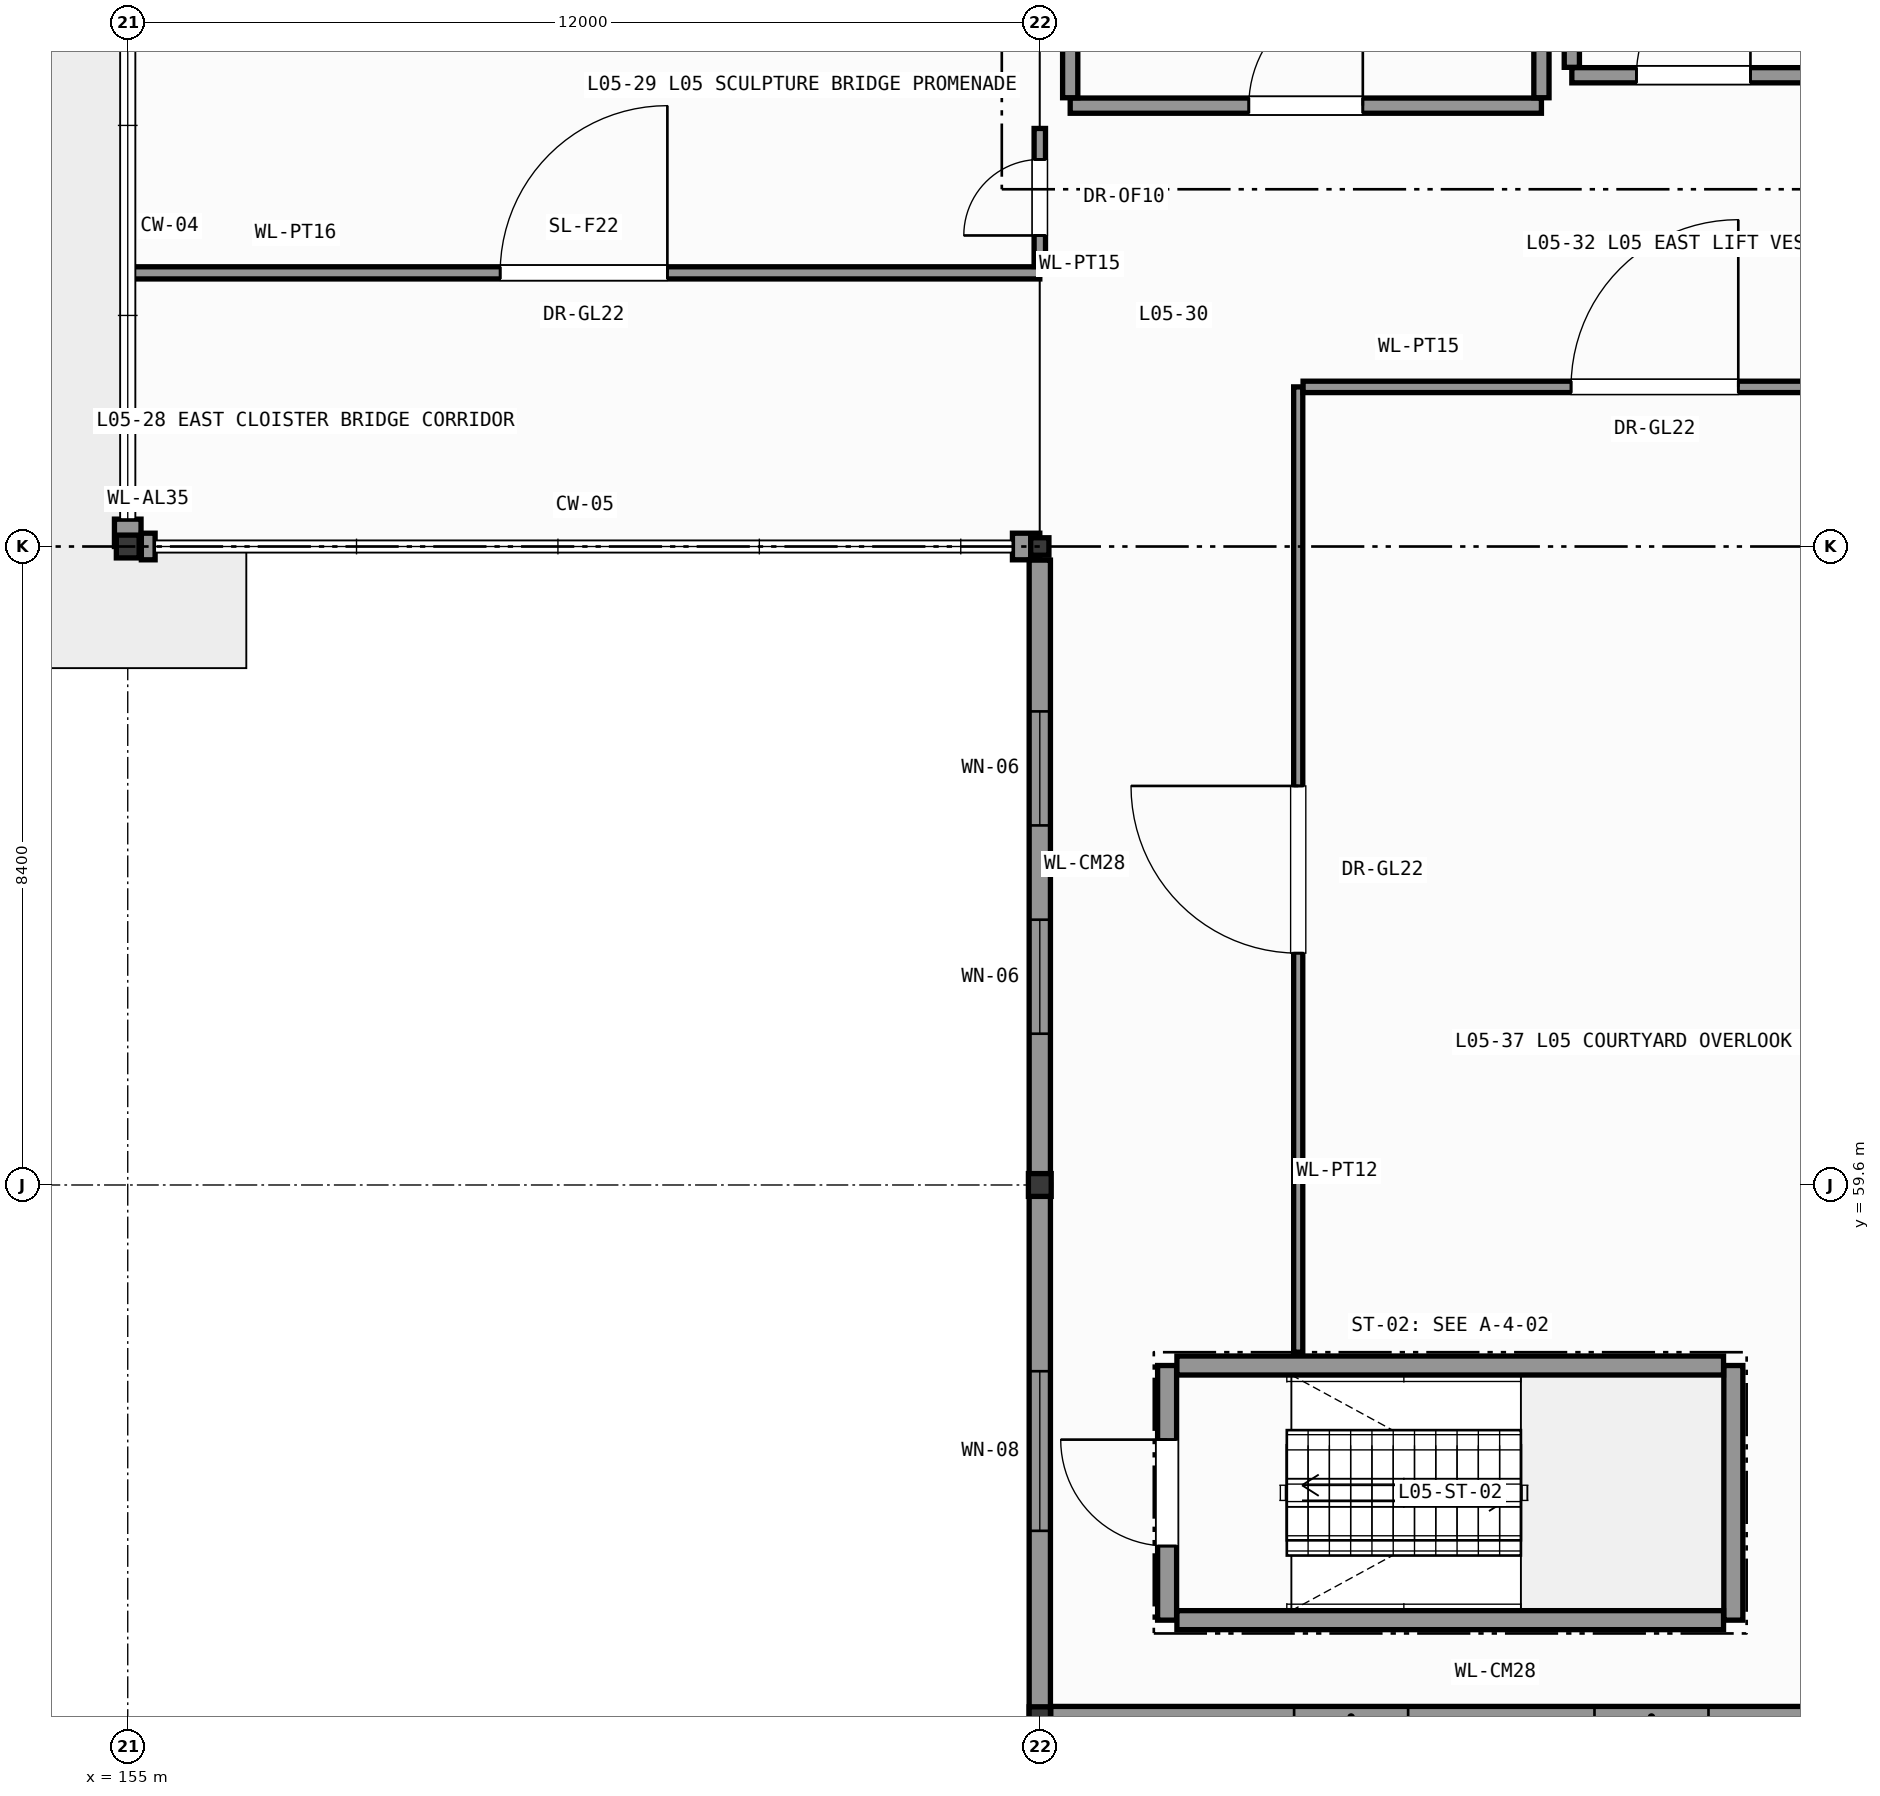
"""IFC4 building model, lengths in metres.
Left out: names, types, materials, properties, quantities, classifications, styles, units other than length and angle.
Written with IfcOpenShell. Run it as: python <this file> out.ifc"""

import sys

from ifc_helpers import new_model, si_unit, direction, frame, frame_2d, origin, origin_2d, place, context, subcontext, project, spatial, rectangle, i_section, extrude, element, fill, save


model = new_model("IFC4")
c1 = context("Model", 3, precision=1e-05, world=origin(), true_north=direction((0.0, 1.0)))
c2 = subcontext(c1, "Body", "Model", "MODEL_VIEW")
j1 = project(units=[si_unit("LENGTHUNIT", "METRE"), si_unit("PLANEANGLEUNIT", "RADIAN")], contexts=[c1])
p1 = place(None, origin())
s1 = spatial("IfcSite", under=j1, at=p1, CompositionType="ELEMENT")
p2 = place(p1, origin())
s2 = spatial("IfcBuilding", under=s1, at=p2, CompositionType="ELEMENT")
p3 = place(p2, frame((0.0, 0.0, 22.2)))
s3 = spatial("IfcBuildingStorey", under=s2, at=p3, CompositionType="ELEMENT", Elevation=22.2)
p4 = place(p3, frame((155.0, 68.0, 0.0), z_axis=(0.0, 0.0, 1.0), x_axis=(1.0, 0.0, 0.0)))
e1 = element("IfcColumn", 1, at=p4, inside=s3, PredefinedType="COLUMN", context=c2, shape_type="SweptSolid", body=[
    extrude(i_section(OverallWidth=0.3, OverallDepth=0.3, WebThickness=0.011, FlangeThickness=0.019, FilletRadius=0.027, at=origin_2d()), origin(), (0.0, 0.0, 1.0), 4.2),
])
p5 = place(p3, frame((167.0, 52.6, 0.0), z_axis=(0.0, 0.0, 1.0), x_axis=(1.0, 0.0, 0.0)))
e2 = element("IfcColumn", 2, at=p5, inside=s3, PredefinedType="COLUMN", context=c2, shape_type="SweptSolid", body=[
    extrude(i_section(OverallWidth=0.28, OverallDepth=0.27, WebThickness=0.008, FlangeThickness=0.013, FilletRadius=0.024, at=origin_2d()), origin(), (0.0, 0.0, 1.0), 4.2),
])
p6 = place(p3, frame((167.0, 59.6, 0.0), z_axis=(0.0, 0.0, 1.0), x_axis=(1.0, 0.0, 0.0)))
e3 = element("IfcColumn", 3, at=p6, inside=s3, PredefinedType="COLUMN", context=c2, shape_type="SweptSolid", body=[
    extrude(i_section(OverallWidth=0.3, OverallDepth=0.3, WebThickness=0.011, FlangeThickness=0.019, FilletRadius=0.027, at=origin_2d()), origin(), (0.0, 0.0, 1.0), 4.2),
])
p7 = place(p3, frame((167.0, 68.0, 0.0), z_axis=(0.0, 0.0, 1.0), x_axis=(1.0, 0.0, 0.0)))
e4 = element("IfcColumn", 4, at=p7, inside=s3, PredefinedType="COLUMN", context=c2, shape_type="SweptSolid", body=[
    extrude(i_section(OverallWidth=0.24, OverallDepth=0.23, WebThickness=0.008, FlangeThickness=0.012, FilletRadius=0.021, at=origin_2d()), origin(), (0.0, 0.0, 1.0), 4.2),
])
p8 = place(p3, frame((155.0, 68.36, 0.0), z_axis=(0.0, 0.0, 1.0), x_axis=(0.0, -1.0, 0.0)))
e5 = element("IfcWall", 5, at=p8, inside=s3, PredefinedType="SOLIDWALL", context=c2, shape_type="SweptSolid", body=[
    extrude(rectangle(XDim=0.36, YDim=0.35, at=frame_2d((0.18, 0.0))), origin(), (0.0, 0.0, 1.0), 3.485),
])
p9 = place(p3, frame((155.179, 68.0, 0.0), z_axis=(0.0, 0.0, 1.0), x_axis=(1.0, 0.0, 0.0)))
e6 = element("IfcWall", 6, at=p9, inside=s3, PredefinedType="SOLIDWALL", context=c2, shape_type="SweptSolid", body=[
    extrude(rectangle(XDim=0.181, YDim=0.35, at=frame_2d((0.091, 0.0))), origin(), (0.0, 0.0, 1.0), 3.98),
])
p10 = place(p3, frame((166.64, 68.0, 0.0), z_axis=(0.0, 0.0, 1.0), x_axis=(1.0, 0.0, 0.0)))
e7 = element("IfcWall", 7, at=p10, inside=s3, PredefinedType="SOLIDWALL", context=c2, shape_type="SweptSolid", body=[
    extrude(rectangle(XDim=0.36, YDim=0.35, at=frame_2d((0.18, 0.0))), origin(), (0.0, 0.0, 1.0), 3.415),
])
p11 = place(p3, frame((167.0, 59.6, 0.0), z_axis=(0.0, 0.0, 1.0), x_axis=(0.0, 1.0, 0.0)))
e8 = element("IfcWall", 8, at=p11, inside=s3, PredefinedType="SOLIDWALL", context=c2, shape_type="SweptSolid", body=[
    extrude(rectangle(XDim=8.221, YDim=0.28, at=frame_2d((4.11, 0.0))), origin(), (0.0, 0.0, 1.0), 3.525),
])
p12 = place(p11, frame((1.99, 0.0, 0.95)))
e9 = element("IfcOpeningElement", 9, at=p12, cuts=e8, PredefinedType="OPENING", context=c2, shape_type="SweptSolid", body=[
    extrude(rectangle(XDim=1.5, YDim=2.18, at=frame_2d((0.75, 1.09))), frame((0.0, 0.15, 0.0), z_axis=(0.0, -1.0, 0.0), x_axis=(1.0, 0.0, 0.0)), (0.0, 0.0, 1.0), 0.3),
])
p13 = place(p11, frame((4.731, 0.0, 0.95)))
e10 = element("IfcOpeningElement", 10, at=p13, cuts=e8, PredefinedType="OPENING", context=c2, shape_type="SweptSolid", body=[
    extrude(rectangle(XDim=1.5, YDim=2.18, at=frame_2d((0.75, 1.09))), frame((0.0, 0.15, 0.0), z_axis=(0.0, -1.0, 0.0), x_axis=(1.0, 0.0, 0.0)), (0.0, 0.0, 1.0), 0.3),
])
p14 = place(p3, frame((167.0, 52.6, 0.0), z_axis=(0.0, 0.0, 1.0), x_axis=(0.0, 1.0, 0.0)))
e11 = element("IfcWall", 11, at=p14, inside=s3, PredefinedType="SOLIDWALL", context=c2, shape_type="SweptSolid", body=[
    extrude(rectangle(XDim=7.0, YDim=0.28, at=frame_2d((3.5, 0.0))), origin(), (0.0, 0.0, 1.0), 3.675),
])
p15 = place(p14, frame((2.45, 0.0, 0.95)))
e12 = element("IfcOpeningElement", 12, at=p15, cuts=e11, PredefinedType="OPENING", context=c2, shape_type="SweptSolid", body=[
    extrude(rectangle(XDim=2.1, YDim=2.33, at=frame_2d((1.05, 1.165))), frame((0.0, 0.15, 0.0), z_axis=(0.0, -1.0, 0.0), x_axis=(1.0, 0.0, 0.0)), (0.0, 0.0, 1.0), 0.3),
])
p16 = place(p3, frame((179.0, 52.6, 0.0), z_axis=(0.0, 0.0, 1.0), x_axis=(-1.0, 0.0, 0.0)))
e13 = element("IfcWall", 13, at=p16, inside=s3, PredefinedType="SOLIDWALL", context=c2, shape_type="SweptSolid", body=[
    extrude(rectangle(XDim=11.856, YDim=0.28, at=frame_2d((5.928, 0.0))), origin(), (0.0, 0.0, 1.0), 3.415),
])
p17 = place(p16, frame((3.202, 0.0, 0.95)))
e14 = element("IfcOpeningElement", 14, at=p17, cuts=e13, PredefinedType="OPENING", context=c2, shape_type="SweptSolid", body=[
    extrude(rectangle(XDim=1.5, YDim=2.06, at=frame_2d((0.75, 1.03))), frame((0.0, 0.15, 0.0), z_axis=(0.0, -1.0, 0.0), x_axis=(1.0, 0.0, 0.0)), (0.0, 0.0, 1.0), 0.3),
])
p18 = place(p16, frame((7.154, 0.0, 0.95)))
e15 = element("IfcOpeningElement", 15, at=p18, cuts=e13, PredefinedType="OPENING", context=c2, shape_type="SweptSolid", body=[
    extrude(rectangle(XDim=1.5, YDim=2.06, at=frame_2d((0.75, 1.03))), frame((0.0, 0.15, 0.0), z_axis=(0.0, -1.0, 0.0), x_axis=(1.0, 0.0, 0.0)), (0.0, 0.0, 1.0), 0.3),
])
p19 = place(p3, frame((168.675, 53.875, 0.0), z_axis=(0.0, 0.0, 1.0), x_axis=(0.0, 1.0, 0.0)))
e16 = element("IfcWall", 16, at=p19, inside=s3, PredefinedType="SHEAR", context=c2, shape_type="SweptSolid", body=[
    extrude(rectangle(XDim=3.35, YDim=0.25, at=frame_2d((1.675, 0.0))), origin(), (0.0, 0.0, 1.0), 3.98),
])
p20 = place(p19, frame((0.975, 0.0, 0.0)))
e17 = element("IfcOpeningElement", 17, at=p20, cuts=e16, PredefinedType="OPENING", context=c2, shape_type="SweptSolid", body=[
    extrude(rectangle(XDim=1.4, YDim=2.2, at=frame_2d((0.7, 1.1))), frame((0.0, 0.135, 0.0), z_axis=(0.0, -1.0, 0.0), x_axis=(1.0, 0.0, 0.0)), (0.0, 0.0, 1.0), 0.27),
])
p21 = place(p3, frame((176.125, 53.875, 0.0), z_axis=(0.0, 0.0, 1.0), x_axis=(0.0, 1.0, 0.0)))
e18 = element("IfcWall", 18, at=p21, inside=s3, PredefinedType="SHEAR", context=c2, shape_type="SweptSolid", body=[
    extrude(rectangle(XDim=3.35, YDim=0.25, at=frame_2d((1.675, 0.0))), origin(), (0.0, 0.0, 1.0), 3.98),
])
for number, where, z_axis, x_axis in (
    (19, (168.804, 53.875, 0.0), (0.0, 0.0, 1.0), (1.0, 0.0, 0.0)),
    (20, (168.804, 57.225, 0.0), (0.0, 0.0, 1.0), (1.0, 0.0, 0.0)),
):
    element("IfcWall", number, at=place(p3, frame(where, z_axis=z_axis, x_axis=x_axis)), inside=s3, PredefinedType="SHEAR", context=c2, shape_type="SweptSolid", body=[
        extrude(rectangle(XDim=7.192, YDim=0.25, at=frame_2d((3.596, 0.0))), origin(), (0.0, 0.0, 1.0), 3.98),
    ])
p22 = place(p3, frame((167.4, 73.8, 0.0), z_axis=(0.0, 0.0, 1.0), x_axis=(1.0, 0.0, 0.0)))
e21 = element("IfcWall", 21, at=p22, inside=s3, PredefinedType="PARTITIONING", context=c2, shape_type="SweptSolid", body=[
    extrude(rectangle(XDim=6.2, YDim=0.2, at=frame_2d((3.1, 0.0))), origin(), (0.0, 0.0, 1.0), 3.605),
])
p23 = place(p22, frame((2.35, 0.0, 0.0)))
e22 = element("IfcOpeningElement", 22, at=p23, cuts=e21, PredefinedType="OPENING", context=c2, shape_type="SweptSolid", body=[
    extrude(rectangle(XDim=1.5, YDim=2.2, at=frame_2d((0.75, 1.1))), frame((0.0, 0.11, 0.0), z_axis=(0.0, -1.0, 0.0), x_axis=(1.0, 0.0, 0.0)), (0.0, 0.0, 1.0), 0.22),
])
for number, where, z_axis, x_axis in (
    (23, (167.4, 73.904, 0.0), (0.0, 0.0, 1.0), (0.0, 1.0, 0.0)),
    (24, (173.6, 73.904, 0.0), (0.0, 0.0, 1.0), (0.0, 1.0, 0.0)),
):
    element("IfcWall", number, at=place(p3, frame(where, z_axis=z_axis, x_axis=x_axis)), inside=s3, PredefinedType="PARTITIONING", context=c2, shape_type="SweptSolid", body=[
        extrude(rectangle(XDim=4.296, YDim=0.2, at=frame_2d((2.148, 0.0))), origin(), (0.0, 0.0, 1.0), 3.98),
    ])
p24 = place(p3, frame((174.0, 74.2, 0.0), z_axis=(0.0, 0.0, 1.0), x_axis=(1.0, 0.0, 0.0)))
e25 = element("IfcWall", 25, at=p24, inside=s3, PredefinedType="PARTITIONING", context=c2, shape_type="SweptSolid", body=[
    extrude(rectangle(XDim=3.2, YDim=0.2, at=frame_2d((1.6, 0.0))), origin(), (0.0, 0.0, 1.0), 3.98),
])
p25 = place(p24, frame((0.85, 0.0, 0.0)))
e26 = element("IfcOpeningElement", 26, at=p25, cuts=e25, PredefinedType="OPENING", context=c2, shape_type="SweptSolid", body=[
    extrude(rectangle(XDim=1.5, YDim=2.2, at=frame_2d((0.75, 1.1))), frame((0.0, 0.11, 0.0), z_axis=(0.0, -1.0, 0.0), x_axis=(1.0, 0.0, 0.0)), (0.0, 0.0, 1.0), 0.22),
])
p26 = place(p3, frame((174.0, 74.304, 0.0), z_axis=(0.0, 0.0, 1.0), x_axis=(0.0, 1.0, 0.0)))
e27 = element("IfcWall", 27, at=p26, inside=s3, PredefinedType="PARTITIONING", context=c2, shape_type="SweptSolid", body=[
    extrude(rectangle(XDim=3.896, YDim=0.2, at=frame_2d((1.948, 0.0))), origin(), (0.0, 0.0, 1.0), 3.98),
])
p27 = place(p3, frame((155.0, 71.6, 0.0), z_axis=(0.0, 0.0, 1.0), x_axis=(1.0, 0.0, 0.0)))
e28 = element("IfcWall", 28, at=p27, inside=s3, PredefinedType="PARTITIONING", context=c2, shape_type="SweptSolid", body=[
    extrude(rectangle(XDim=12.0, YDim=0.16, at=frame_2d((6.0, 0.0))), origin(), (0.0, 0.0, 1.0), 3.98),
])
p28 = place(p27, frame((4.9, 0.0, 0.0)))
e29 = element("IfcOpeningElement", 29, at=p28, cuts=e28, PredefinedType="OPENING", context=c2, shape_type="SweptSolid", body=[
    extrude(rectangle(XDim=2.2, YDim=2.6, at=frame_2d((1.1, 1.3))), frame((0.0, 0.09, 0.0), z_axis=(0.0, -1.0, 0.0), x_axis=(1.0, 0.0, 0.0)), (0.0, 0.0, 1.0), 0.18),
])
p29 = place(p3, frame((167.0, 71.684, 0.0), z_axis=(0.0, 0.0, 1.0), x_axis=(0.0, 1.0, 0.0)))
e30 = element("IfcWall", 30, at=p29, inside=s3, PredefinedType="PARTITIONING", context=c2, shape_type="SweptSolid", body=[
    extrude(rectangle(XDim=1.816, YDim=0.15, at=frame_2d((0.908, 0.0))), origin(), (0.0, 0.0, 1.0), 3.525),
])
p30 = place(p29, frame((0.408, 0.0, 0.0)))
e31 = element("IfcOpeningElement", 31, at=p30, cuts=e30, PredefinedType="OPENING", context=c2, shape_type="SweptSolid", body=[
    extrude(rectangle(XDim=1.0, YDim=2.15, at=frame_2d((0.5, 1.075))), frame((0.0, 0.085, 0.0), z_axis=(0.0, -1.0, 0.0), x_axis=(1.0, 0.0, 0.0)), (0.0, 0.0, 1.0), 0.17),
])
p31 = place(p3, frame((170.4, 57.4, 0.0), z_axis=(0.0, 0.0, 1.0), x_axis=(0.0, 1.0, 0.0)))
e32 = element("IfcWall", 32, at=p31, inside=s3, PredefinedType="PARTITIONING", context=c2, shape_type="SweptSolid", body=[
    extrude(rectangle(XDim=12.7, YDim=0.12, at=frame_2d((6.35, 0.0))), origin(), (0.0, 0.0, 1.0), 3.98),
])
p32 = place(p31, frame((5.25, 0.0, 0.0)))
e33 = element("IfcOpeningElement", 33, at=p32, cuts=e32, PredefinedType="OPENING", context=c2, shape_type="SweptSolid", body=[
    extrude(rectangle(XDim=2.2, YDim=2.6, at=frame_2d((1.1, 1.3))), frame((0.0, 0.07, 0.0), z_axis=(0.0, -1.0, 0.0), x_axis=(1.0, 0.0, 0.0)), (0.0, 0.0, 1.0), 0.14),
])
p33 = place(p3, frame((170.464, 70.1, 0.0), z_axis=(0.0, 0.0, 1.0), x_axis=(1.0, 0.0, 0.0)))
e34 = element("IfcWall", 34, at=p33, inside=s3, PredefinedType="PARTITIONING", context=c2, shape_type="SweptSolid", body=[
    extrude(rectangle(XDim=9.252, YDim=0.15, at=frame_2d((4.626, 0.0))), origin(), (0.0, 0.0, 1.0), 3.98),
])
p34 = place(p33, frame((3.526, 0.0, 0.0)))
e35 = element("IfcOpeningElement", 35, at=p34, cuts=e34, PredefinedType="OPENING", context=c2, shape_type="SweptSolid", body=[
    extrude(rectangle(XDim=2.2, YDim=2.6, at=frame_2d((1.1, 1.3))), frame((0.0, 0.085, 0.0), z_axis=(0.0, -1.0, 0.0), x_axis=(1.0, 0.0, 0.0)), (0.0, 0.0, 1.0), 0.17),
])
p35 = place(p12, origin())
e36 = element("IfcWindow", 36, at=p35, inside=s3, PartitioningType="SINGLE_PANEL", PredefinedType="WINDOW", context=c2, shape_type="SweptSolid", body=[
    extrude(rectangle(XDim=1.5, YDim=2.18, at=frame_2d((0.75, 1.09))), frame((0.0, 0.03, 0.0), z_axis=(0.0, -1.0, 0.0), x_axis=(1.0, 0.0, 0.0)), (0.0, 0.0, 1.0), 0.06),
])
fill(e9, e36)
p36 = place(p13, origin())
e37 = element("IfcWindow", 37, at=p36, inside=s3, PartitioningType="SINGLE_PANEL", PredefinedType="WINDOW", context=c2, shape_type="SweptSolid", body=[
    extrude(rectangle(XDim=1.5, YDim=2.18, at=frame_2d((0.75, 1.09))), frame((0.0, 0.03, 0.0), z_axis=(0.0, -1.0, 0.0), x_axis=(1.0, 0.0, 0.0)), (0.0, 0.0, 1.0), 0.06),
])
fill(e10, e37)
p37 = place(p15, origin())
e38 = element("IfcWindow", 38, at=p37, inside=s3, PartitioningType="SINGLE_PANEL", PredefinedType="WINDOW", context=c2, shape_type="SweptSolid", body=[
    extrude(rectangle(XDim=2.1, YDim=2.33, at=frame_2d((1.05, 1.165))), frame((0.0, 0.03, 0.0), z_axis=(0.0, -1.0, 0.0), x_axis=(1.0, 0.0, 0.0)), (0.0, 0.0, 1.0), 0.06),
])
fill(e12, e38)
p38 = place(p17, origin())
e39 = element("IfcWindow", 39, at=p38, inside=s3, PartitioningType="SINGLE_PANEL", PredefinedType="WINDOW", context=c2, shape_type="SweptSolid", body=[
    extrude(rectangle(XDim=1.5, YDim=2.06, at=frame_2d((0.75, 1.03))), frame((0.0, 0.03, 0.0), z_axis=(0.0, -1.0, 0.0), x_axis=(1.0, 0.0, 0.0)), (0.0, 0.0, 1.0), 0.06),
])
fill(e14, e39)
p39 = place(p18, origin())
e40 = element("IfcWindow", 40, at=p39, inside=s3, PartitioningType="SINGLE_PANEL", PredefinedType="WINDOW", context=c2, shape_type="SweptSolid", body=[
    extrude(rectangle(XDim=1.5, YDim=2.06, at=frame_2d((0.75, 1.03))), frame((0.0, 0.03, 0.0), z_axis=(0.0, -1.0, 0.0), x_axis=(1.0, 0.0, 0.0)), (0.0, 0.0, 1.0), 0.06),
])
fill(e15, e40)
p40 = place(p20, origin())
e41 = element("IfcDoor", 41, at=p40, inside=s3, OperationType="SINGLE_SWING_RIGHT", PredefinedType="DOOR", context=c2, shape_type="SweptSolid", body=[
    extrude(rectangle(XDim=1.4, YDim=2.2, at=frame_2d((0.7, 1.1))), frame((0.0, 0.025, 0.0), z_axis=(0.0, -1.0, 0.0), x_axis=(1.0, 0.0, 0.0)), (0.0, 0.0, 1.0), 0.05),
])
fill(e17, e41)
p41 = place(p23, origin())
e42 = element("IfcDoor", 42, at=p41, inside=s3, OperationType="SINGLE_SWING_RIGHT", PredefinedType="DOOR", context=c2, shape_type="SweptSolid", body=[
    extrude(rectangle(XDim=1.5, YDim=2.2, at=frame_2d((0.75, 1.1))), frame((0.0, 0.025, 0.0), z_axis=(0.0, -1.0, 0.0), x_axis=(1.0, 0.0, 0.0)), (0.0, 0.0, 1.0), 0.05),
])
fill(e22, e42)
p42 = place(p25, origin())
e43 = element("IfcDoor", 43, at=p42, inside=s3, OperationType="SINGLE_SWING_RIGHT", PredefinedType="DOOR", context=c2, shape_type="SweptSolid", body=[
    extrude(rectangle(XDim=1.5, YDim=2.2, at=frame_2d((0.75, 1.1))), frame((0.0, 0.025, 0.0), z_axis=(0.0, -1.0, 0.0), x_axis=(1.0, 0.0, 0.0)), (0.0, 0.0, 1.0), 0.05),
])
fill(e26, e43)
p43 = place(p28, origin())
e44 = element("IfcDoor", 44, at=p43, inside=s3, OperationType="SINGLE_SWING_RIGHT", PredefinedType="DOOR", context=c2, shape_type="SweptSolid", body=[
    extrude(rectangle(XDim=2.2, YDim=2.6, at=frame_2d((1.1, 1.3))), frame((0.0, 0.025, 0.0), z_axis=(0.0, -1.0, 0.0), x_axis=(1.0, 0.0, 0.0)), (0.0, 0.0, 1.0), 0.05),
])
fill(e29, e44)
p44 = place(p30, origin())
e45 = element("IfcDoor", 45, at=p44, inside=s3, OperationType="SINGLE_SWING_LEFT", PredefinedType="DOOR", context=c2, shape_type="SweptSolid", body=[
    extrude(rectangle(XDim=1.0, YDim=2.15, at=frame_2d((0.5, 1.075))), frame((0.0, 0.025, 0.0), z_axis=(0.0, -1.0, 0.0), x_axis=(1.0, 0.0, 0.0)), (0.0, 0.0, 1.0), 0.05),
])
fill(e31, e45)
p45 = place(p32, origin())
e46 = element("IfcDoor", 46, at=p45, inside=s3, OperationType="SINGLE_SWING_RIGHT", PredefinedType="DOOR", context=c2, shape_type="SweptSolid", body=[
    extrude(rectangle(XDim=2.2, YDim=2.6, at=frame_2d((1.1, 1.3))), frame((0.0, 0.025, 0.0), z_axis=(0.0, -1.0, 0.0), x_axis=(1.0, 0.0, 0.0)), (0.0, 0.0, 1.0), 0.05),
])
fill(e33, e46)
p46 = place(p34, origin())
e47 = element("IfcDoor", 47, at=p46, inside=s3, OperationType="SINGLE_SWING_RIGHT", PredefinedType="DOOR", context=c2, shape_type="SweptSolid", body=[
    extrude(rectangle(XDim=2.2, YDim=2.6, at=frame_2d((1.1, 1.3))), frame((0.0, 0.025, 0.0), z_axis=(0.0, -1.0, 0.0), x_axis=(1.0, 0.0, 0.0)), (0.0, 0.0, 1.0), 0.05),
])
fill(e35, e47)
save(model, sys.argv[1])
